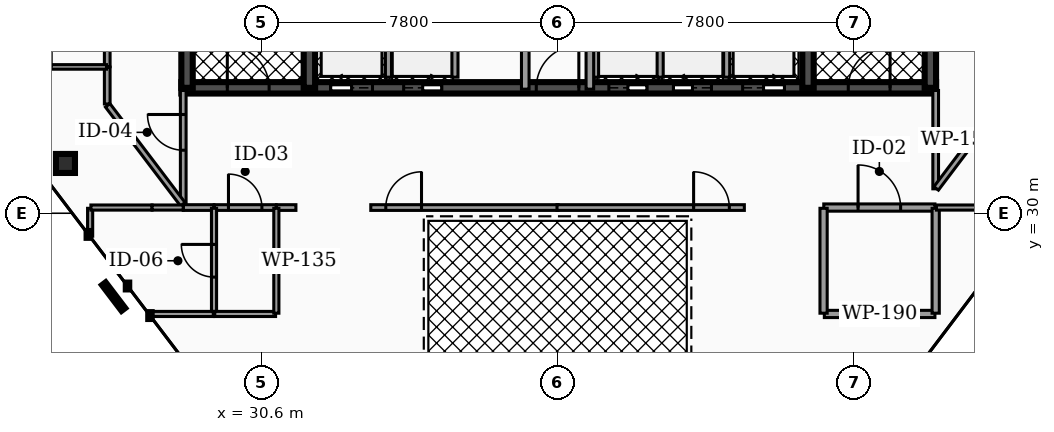
"""IFC4 building model, lengths in metres.
Left out: names, types, materials, properties, quantities, classifications, styles, units other than length and angle.
Written with IfcOpenShell. Run it as: python <this file> out.ifc"""

import sys

from ifc_helpers import new_model, si_unit, direction, frame, frame_2d, origin, origin_2d, place, context, subcontext, project, spatial, rectangle, hollow_rectangle, extrude, element, fill, save


model = new_model("IFC4")
c1 = context("Model", 3, precision=1e-05, world=origin(), true_north=direction((0.0, 1.0)))
c2 = subcontext(c1, "Body", "Model", "MODEL_VIEW")
j1 = project(units=[si_unit("LENGTHUNIT", "METRE"), si_unit("PLANEANGLEUNIT", "RADIAN")], contexts=[c1])
p1 = place(None, origin())
s1 = spatial("IfcSite", under=j1, at=p1, CompositionType="ELEMENT")
p2 = place(p1, origin())
s2 = spatial("IfcBuilding", under=s1, at=p2, CompositionType="ELEMENT")
p3 = place(p2, frame((0.0, 0.0, 275.4)))
s3 = spatial("IfcBuildingStorey", under=s2, at=p3, CompositionType="ELEMENT", Elevation=275.4)
p4 = place(p3, frame((28.5, 33.3, 0.0), z_axis=(0.0, 0.0, 1.0), x_axis=(1.0, 0.0, 0.0)))
e1 = element("IfcWall", 1, at=p4, inside=s3, PredefinedType="SHEAR", context=c2, shape_type="SweptSolid", body=[
    extrude(rectangle(XDim=19.86, YDim=0.3, at=frame_2d((9.93, 0.0))), origin(), (0.0, 0.0, 1.0), 3.18),
])
p5 = place(p4, frame((3.93, 0.0, 0.0)))
e2 = element("IfcOpeningElement", 2, at=p5, cuts=e1, PredefinedType="OPENING", context=c2, shape_type="SweptSolid", body=[
    extrude(rectangle(XDim=1.1, YDim=2.15, at=frame_2d((0.55, 1.075))), frame((0.0, 0.16, 0.0), z_axis=(0.0, -1.0, 0.0), x_axis=(1.0, 0.0, 0.0)), (0.0, 0.0, 1.0), 0.32),
])
p6 = place(p4, frame((14.77, 0.0, 0.0)))
e3 = element("IfcOpeningElement", 3, at=p6, cuts=e1, PredefinedType="OPENING", context=c2, shape_type="SweptSolid", body=[
    extrude(rectangle(XDim=1.1, YDim=2.15, at=frame_2d((0.55, 1.075))), frame((0.0, 0.16, 0.0), z_axis=(0.0, -1.0, 0.0), x_axis=(1.0, 0.0, 0.0)), (0.0, 0.0, 1.0), 0.32),
])
p7 = place(p4, frame((11.25, 0.0, 0.0)))
e4 = element("IfcOpeningElement", 4, at=p7, cuts=e1, PredefinedType="OPENING", context=c2, shape_type="SweptSolid", body=[
    extrude(rectangle(XDim=1.0, YDim=2.1, at=frame_2d((0.5, 1.05))), frame((0.0, 0.16, 0.0), z_axis=(0.0, -1.0, 0.0), x_axis=(1.0, 0.0, 0.0)), (0.0, 0.0, 1.0), 0.32),
])
p8 = place(p4, frame((12.95, 0.0, 0.0)))
e5 = element("IfcOpeningElement", 5, at=p8, cuts=e1, PredefinedType="OPENING", context=c2, shape_type="SweptSolid", body=[
    extrude(rectangle(XDim=1.0, YDim=2.1, at=frame_2d((0.5, 1.05))), frame((0.0, 0.16, 0.0), z_axis=(0.0, -1.0, 0.0), x_axis=(1.0, 0.0, 0.0)), (0.0, 0.0, 1.0), 0.32),
])
p9 = place(p4, frame((5.85, 0.0, 0.0)))
e6 = element("IfcOpeningElement", 6, at=p9, cuts=e1, PredefinedType="OPENING", context=c2, shape_type="SweptSolid", body=[
    extrude(rectangle(XDim=1.0, YDim=2.1, at=frame_2d((0.5, 1.05))), frame((0.0, 0.16, 0.0), z_axis=(0.0, -1.0, 0.0), x_axis=(1.0, 0.0, 0.0)), (0.0, 0.0, 1.0), 0.32),
])
p10 = place(p4, frame((1.21, 0.0, 0.0)))
e7 = element("IfcOpeningElement", 7, at=p10, cuts=e1, PredefinedType="OPENING", context=c2, shape_type="SweptSolid", body=[
    extrude(rectangle(XDim=1.1, YDim=2.2, at=frame_2d((0.55, 1.1))), frame((0.0, 0.16, 0.0), z_axis=(0.0, -1.0, 0.0), x_axis=(1.0, 0.0, 0.0)), (0.0, 0.0, 1.0), 0.32),
])
p11 = place(p4, frame((9.34, 0.0, 0.0)))
e8 = element("IfcOpeningElement", 8, at=p11, cuts=e1, PredefinedType="OPENING", context=c2, shape_type="SweptSolid", body=[
    extrude(rectangle(XDim=1.12, YDim=2.05, at=frame_2d((0.56, 1.025))), frame((0.0, 0.16, 0.0), z_axis=(0.0, -1.0, 0.0), x_axis=(1.0, 0.0, 0.0)), (0.0, 0.0, 1.0), 0.32),
])
p12 = place(p4, frame((17.55, 0.0, 0.0)))
e9 = element("IfcOpeningElement", 9, at=p12, cuts=e1, PredefinedType="OPENING", context=c2, shape_type="SweptSolid", body=[
    extrude(rectangle(XDim=1.1, YDim=2.2, at=frame_2d((0.55, 1.1))), frame((0.0, 0.16, 0.0), z_axis=(0.0, -1.0, 0.0), x_axis=(1.0, 0.0, 0.0)), (0.0, 0.0, 1.0), 0.32),
])
for number, where, z_axis, x_axis in (
    (10, (28.65, 33.3, 0.0), (0.0, 0.0, 1.0), (0.0, 1.0, 0.0)),
    (11, (31.87, 33.3, 0.0), (0.0, 0.0, 1.0), (0.0, 1.0, 0.0)),
    (12, (44.99, 33.3, 0.0), (0.0, 0.0, 1.0), (0.0, 1.0, 0.0)),
    (13, (48.21, 33.3, 0.0), (0.0, 0.0, 1.0), (0.0, 1.0, 0.0)),
):
    element("IfcWall", number, at=place(p3, frame(where, z_axis=z_axis, x_axis=x_axis)), inside=s3, PredefinedType="SHEAR", context=c2, shape_type="SweptSolid", body=[
        extrude(rectangle(XDim=10.1, YDim=0.3, at=frame_2d((5.05, 0.0))), origin(), (0.0, 0.0, 1.0), 3.18),
    ])
p13 = place(p3, frame((25.451, 31.31, 0.0), z_axis=(0.06991126496, 0.123712542777, 0.989852323224), x_axis=(-0.870602675334, 0.491986769845, 0.0)))
e14 = element("IfcColumn", 14, at=p13, inside=s3, PredefinedType="COLUMN", context=c2, shape_type="SweptSolid", body=[
    extrude(hollow_rectangle(XDim=0.5, YDim=0.5, WallThickness=0.025, at=origin_2d()), origin(), (0.0, 0.0, 1.0), 3.213),
])
p14 = place(p3, frame((29.731, 25.674, 0.0), z_axis=(0.069335984522, 0.128875318438, 0.989233882127), x_axis=(-0.880637676987, 0.47379033535, 0.0)))
e15 = element("IfcColumn", 15, at=p14, inside=s3, PredefinedType="COLUMN", context=c2, shape_type="SweptSolid", body=[
    extrude(hollow_rectangle(XDim=0.5, YDim=0.5, WallThickness=0.025, at=origin_2d()), origin(), (0.0, 0.0, 1.0), 3.215),
])
p15 = place(p3, frame((46.938, 25.77, 0.0), z_axis=(-0.133126474894, 0.126032433715, 0.983052982974), x_axis=(-0.687493396244, -0.726190629326, 0.0)))
e16 = element("IfcColumn", 16, at=p15, inside=s3, PredefinedType="COLUMN", context=c2, shape_type="SweptSolid", body=[
    extrude(hollow_rectangle(XDim=0.5, YDim=0.5, WallThickness=0.025, at=origin_2d()), origin(), (0.0, 0.0, 1.0), 3.235),
])
for number, where, z_axis, x_axis in (
    (17, (33.95, 33.58, 0.0), (0.0, 0.0, 1.0), (0.0, 1.0, 0.0)),
    (18, (42.85, 33.58, 0.0), (0.0, 0.0, 1.0), (0.0, 1.0, 0.0)),
):
    element("IfcWall", number, at=place(p3, frame(where, z_axis=z_axis, x_axis=x_axis)), inside=s3, PredefinedType="SOLIDWALL", context=c2, shape_type="SweptSolid", body=[
        extrude(rectangle(XDim=2.45, YDim=0.16, at=frame_2d((1.225, 0.0))), origin(), (0.0, 0.0, 1.0), 3.18),
    ])
for number, where, z_axis, x_axis in (
    (19, (39.4, 33.58, 0.0), (0.0, 0.0, 1.0), (0.0, 1.0, 0.0)),
    (20, (41.1, 33.58, 0.0), (0.0, 0.0, 1.0), (0.0, 1.0, 0.0)),
    (21, (35.7, 33.58, 0.0), (0.0, 0.0, 1.0), (0.0, 1.0, 0.0)),
):
    element("IfcWall", number, at=place(p3, frame(where, z_axis=z_axis, x_axis=x_axis)), inside=s3, PredefinedType="SOLIDWALL", context=c2, shape_type="SweptSolid", body=[
        extrude(rectangle(XDim=2.25, YDim=0.16, at=frame_2d((1.125, 0.0))), origin(), (0.0, 0.0, 1.0), 3.18),
    ])
p16 = place(p3, frame((37.55, 33.265, 0.0), z_axis=(0.0, 0.0, 1.0), x_axis=(0.0, 1.0, 0.0)))
e22 = element("IfcWall", 22, at=p16, inside=s3, PredefinedType="PARTITIONING", context=c2, shape_type="SweptSolid", body=[
    extrude(rectangle(XDim=3.615, YDim=0.2, at=frame_2d((1.808, 0.0))), origin(), (0.0, 0.0, 1.0), 2.235),
])
p17 = place(p16, frame((1.367, 0.0, 0.0)))
e23 = element("IfcOpeningElement", 23, at=p17, cuts=e22, PredefinedType="OPENING", context=c2, shape_type="SweptSolid", body=[
    extrude(rectangle(XDim=0.88, YDim=2.05, at=frame_2d((0.44, 1.025))), frame((0.0, 0.11, 0.0), z_axis=(0.0, -1.0, 0.0), x_axis=(1.0, 0.0, 0.0)), (0.0, 0.0, 1.0), 0.22),
])
p18 = place(p3, frame((39.25, 33.265, 0.0), z_axis=(0.0, 0.0, 1.0), x_axis=(0.0, 1.0, 0.0)))
e24 = element("IfcWall", 24, at=p18, inside=s3, PredefinedType="PARTITIONING", context=c2, shape_type="SweptSolid", body=[
    extrude(rectangle(XDim=3.615, YDim=0.2, at=frame_2d((1.808, 0.0))), origin(), (0.0, 0.0, 1.0), 2.235),
])
p19 = place(p3, frame((45.405, 30.15, 0.0), z_axis=(0.0, 0.0, 1.0), x_axis=(1.0, 0.0, 0.0)))
e25 = element("IfcWall", 25, at=p19, inside=s3, PredefinedType="PARTITIONING", context=c2, shape_type="SweptSolid", body=[
    extrude(rectangle(XDim=2.925, YDim=0.19, at=frame_2d((1.462, 0.0))), origin(), (0.0, 0.0, 1.0), 2.235),
])
p20 = place(p19, frame((0.903, 0.0, 0.0)))
e26 = element("IfcOpeningElement", 26, at=p20, cuts=e25, PredefinedType="OPENING", context=c2, shape_type="SweptSolid", body=[
    extrude(rectangle(XDim=1.12, YDim=2.05, at=frame_2d((0.56, 1.025))), frame((0.0, 0.105, 0.0), z_axis=(0.0, -1.0, 0.0), x_axis=(1.0, 0.0, 0.0)), (0.0, 0.0, 1.0), 0.21),
])
p21 = place(p3, frame((28.55, 30.227, 0.0), z_axis=(0.0, 0.0, 1.0), x_axis=(0.0, 1.0, 0.0)))
e27 = element("IfcWall", 27, at=p21, inside=s3, PredefinedType="PARTITIONING", context=c2, shape_type="SweptSolid", body=[
    extrude(rectangle(XDim=3.003, YDim=0.15, at=frame_2d((1.501, 0.0))), origin(), (0.0, 0.0, 1.0), 2.235),
])
p22 = place(p21, frame((1.431, 0.0, 0.0)))
e28 = element("IfcOpeningElement", 28, at=p22, cuts=e27, PredefinedType="OPENING", context=c2, shape_type="SweptSolid", body=[
    extrude(rectangle(XDim=0.94, YDim=2.05, at=frame_2d((0.47, 1.025))), frame((0.0, 0.085, 0.0), z_axis=(0.0, -1.0, 0.0), x_axis=(1.0, 0.0, 0.0)), (0.0, 0.0, 1.0), 0.17),
])
p23 = place(p3, frame((48.35, 30.643, 0.0), z_axis=(0.0, 0.0, 1.0), x_axis=(0.0, 1.0, 0.0)))
e29 = element("IfcWall", 29, at=p23, inside=s3, PredefinedType="PARTITIONING", context=c2, shape_type="SweptSolid", body=[
    extrude(rectangle(XDim=2.587, YDim=0.15, at=frame_2d((1.294, 0.0))), origin(), (0.0, 0.0, 1.0), 2.235),
])
p24 = place(p3, frame((29.365, 30.15, 0.0), z_axis=(0.0, 0.0, 1.0), x_axis=(1.0, 0.0, 0.0)))
e30 = element("IfcWall", 30, at=p24, inside=s3, PredefinedType="PARTITIONING", context=c2, shape_type="SweptSolid", body=[
    extrude(rectangle(XDim=1.63, YDim=0.15, at=frame_2d((0.815, 0.0))), origin(), (0.0, 0.0, 1.0), 2.235),
])
p25 = place(p24, frame((0.375, 0.0, 0.0)))
e31 = element("IfcOpeningElement", 31, at=p25, cuts=e30, PredefinedType="OPENING", context=c2, shape_type="SweptSolid", body=[
    extrude(rectangle(XDim=0.88, YDim=2.05, at=frame_2d((0.44, 1.025))), frame((0.0, 0.085, 0.0), z_axis=(0.0, -1.0, 0.0), x_axis=(1.0, 0.0, 0.0)), (0.0, 0.0, 1.0), 0.17),
])
p26 = place(p3, frame((28.55, 30.15, 0.0), z_axis=(0.0, 0.0, 1.0), x_axis=(1.0, 0.0, 0.0)))
e32 = element("IfcWall", 32, at=p26, inside=s3, PredefinedType="PARTITIONING", context=c2, shape_type="SweptSolid", body=[
    extrude(rectangle(XDim=0.805, YDim=0.15, at=frame_2d((0.402, 0.0))), origin(), (0.0, 0.0, 1.0), 2.235),
])
p27 = place(p3, frame((33.485, 30.15, 0.0), z_axis=(0.0, 0.0, 1.0), x_axis=(1.0, 0.0, 0.0)))
e33 = element("IfcWall", 33, at=p27, inside=s3, PredefinedType="PARTITIONING", context=c2, shape_type="SweptSolid", body=[
    extrude(rectangle(XDim=4.93, YDim=0.15, at=frame_2d((2.465, 0.0))), origin(), (0.0, 0.0, 1.0), 2.235),
])
p28 = place(p27, frame((0.395, 0.0, 0.0)))
e34 = element("IfcOpeningElement", 34, at=p28, cuts=e33, PredefinedType="OPENING", context=c2, shape_type="SweptSolid", body=[
    extrude(rectangle(XDim=0.94, YDim=2.05, at=frame_2d((0.47, 1.025))), frame((0.0, 0.085, 0.0), z_axis=(0.0, -1.0, 0.0), x_axis=(1.0, 0.0, 0.0)), (0.0, 0.0, 1.0), 0.17),
])
p29 = place(p3, frame((31.005, 30.15, 0.0), z_axis=(0.0, 0.0, 1.0), x_axis=(1.0, 0.0, 0.0)))
e35 = element("IfcWall", 35, at=p29, inside=s3, PredefinedType="PARTITIONING", context=c2, shape_type="SweptSolid", body=[
    extrude(rectangle(XDim=0.51, YDim=0.15, at=frame_2d((0.255, 0.0))), origin(), (0.0, 0.0, 1.0), 2.235),
])
p30 = place(p3, frame((38.385, 30.15, 0.0), z_axis=(0.0, 0.0, 1.0), x_axis=(1.0, 0.0, 0.0)))
e36 = element("IfcWall", 36, at=p30, inside=s3, PredefinedType="PARTITIONING", context=c2, shape_type="SweptSolid", body=[
    extrude(rectangle(XDim=4.93, YDim=0.15, at=frame_2d((2.465, 0.0))), origin(), (0.0, 0.0, 1.0), 2.235),
])
p31 = place(p30, frame((3.595, 0.0, 0.0)))
e37 = element("IfcOpeningElement", 37, at=p31, cuts=e36, PredefinedType="OPENING", context=c2, shape_type="SweptSolid", body=[
    extrude(rectangle(XDim=0.94, YDim=2.05, at=frame_2d((0.47, 1.025))), frame((0.0, 0.085, 0.0), z_axis=(0.0, -1.0, 0.0), x_axis=(1.0, 0.0, 0.0)), (0.0, 0.0, 1.0), 0.17),
])
p32 = place(p3, frame((45.42, 27.35, 0.0), z_axis=(0.0, 0.0, 1.0), x_axis=(1.0, 0.0, 0.0)))
e38 = element("IfcWall", 38, at=p32, inside=s3, PredefinedType="PARTITIONING", context=c2, shape_type="SweptSolid", body=[
    extrude(rectangle(XDim=2.91, YDim=0.19, at=frame_2d((1.455, 0.0))), origin(), (0.0, 0.0, 1.0), 2.235),
])
for number, where, z_axis, x_axis in (
    (39, (45.4, 27.37, 0.0), (0.0, 0.0, 1.0), (0.0, 1.0, 0.0)),
    (40, (48.35, 27.37, 0.0), (0.0, 0.0, 1.0), (0.0, 1.0, 0.0)),
):
    element("IfcWall", number, at=place(p3, frame(where, z_axis=z_axis, x_axis=x_axis)), inside=s3, PredefinedType="PARTITIONING", context=c2, shape_type="SweptSolid", body=[
        extrude(rectangle(XDim=2.76, YDim=0.19, at=frame_2d((1.38, 0.0))), origin(), (0.0, 0.0, 1.0), 2.235),
    ])
p33 = place(p3, frame((26.55, 33.855, 0.0), z_axis=(0.0, 0.0, 1.0), x_axis=(0.0, 1.0, 0.0)))
e41 = element("IfcWall", 41, at=p33, inside=s3, PredefinedType="PARTITIONING", context=c2, shape_type="SweptSolid", body=[
    extrude(rectangle(XDim=9.695, YDim=0.15, at=frame_2d((4.847, 0.0))), origin(), (0.0, 0.0, 1.0), 2.235),
])
p34 = place(p33, frame((4.377, 0.0, 0.0)))
e42 = element("IfcOpeningElement", 42, at=p34, cuts=e41, PredefinedType="OPENING", context=c2, shape_type="SweptSolid", body=[
    extrude(rectangle(XDim=0.94, YDim=2.05, at=frame_2d((0.47, 1.025))), frame((0.0, 0.085, 0.0), z_axis=(0.0, -1.0, 0.0), x_axis=(1.0, 0.0, 0.0)), (0.0, 0.0, 1.0), 0.17),
])
p35 = place(p3, frame((26.562, 32.84, 0.0), z_axis=(0.0, 0.0, 1.0), x_axis=(0.604783852999, -0.796389660375, 0.0)))
e43 = element("IfcWall", 43, at=p35, inside=s3, PredefinedType="PARTITIONING", context=c2, shape_type="SweptSolid", body=[
    extrude(rectangle(XDim=3.267, YDim=0.15, at=frame_2d((1.634, 0.0))), origin(), (0.0, 0.0, 1.0), 2.235),
])
p36 = place(p3, frame((26.55, 32.875, 0.0), z_axis=(0.0, 0.0, 1.0), x_axis=(0.0, 1.0, 0.0)))
e44 = element("IfcWall", 44, at=p36, inside=s3, PredefinedType="PARTITIONING", context=c2, shape_type="SweptSolid", body=[
    extrude(rectangle(XDim=0.97, YDim=0.15, at=frame_2d((0.485, 0.0))), origin(), (0.0, 0.0, 1.0), 2.235),
])
p37 = place(p3, frame((48.362, 30.654, 0.0), z_axis=(0.0, 0.0, 1.0), x_axis=(0.603189668488, 0.79759778324, 0.0)))
e45 = element("IfcWall", 45, at=p37, inside=s3, PredefinedType="PARTITIONING", context=c2, shape_type="SweptSolid", body=[
    extrude(rectangle(XDim=2.886, YDim=0.15, at=frame_2d((1.443, 0.0))), origin(), (0.0, 0.0, 1.0), 2.235),
])
p38 = place(p3, frame((29.36, 27.37, 0.0), z_axis=(0.0, 0.0, 1.0), x_axis=(0.0, 1.0, 0.0)))
e46 = element("IfcWall", 46, at=p38, inside=s3, PredefinedType="PARTITIONING", context=c2, shape_type="SweptSolid", body=[
    extrude(rectangle(XDim=2.76, YDim=0.135, at=frame_2d((1.38, 0.0))), origin(), (0.0, 0.0, 1.0), 2.235),
])
p39 = place(p38, frame((0.95, 0.0, 0.0)))
e47 = element("IfcOpeningElement", 47, at=p39, cuts=e46, PredefinedType="OPENING", context=c2, shape_type="SweptSolid", body=[
    extrude(rectangle(XDim=0.86, YDim=2.05, at=frame_2d((0.43, 1.025))), frame((0.0, 0.077, 0.0), z_axis=(0.0, -1.0, 0.0), x_axis=(1.0, 0.0, 0.0)), (0.0, 0.0, 1.0), 0.155),
])
p40 = place(p3, frame((29.38, 27.35, 0.0), z_axis=(0.0, 0.0, 1.0), x_axis=(1.0, 0.0, 0.0)))
e48 = element("IfcWall", 48, at=p40, inside=s3, PredefinedType="PARTITIONING", context=c2, shape_type="SweptSolid", body=[
    extrude(rectangle(XDim=1.6, YDim=0.135, at=frame_2d((0.8, 0.0))), origin(), (0.0, 0.0, 1.0), 2.235),
])
p41 = place(p3, frame((31.0, 27.37, 0.0), z_axis=(0.0, 0.0, 1.0), x_axis=(0.0, 1.0, 0.0)))
e49 = element("IfcWall", 49, at=p41, inside=s3, PredefinedType="PARTITIONING", context=c2, shape_type="SweptSolid", body=[
    extrude(rectangle(XDim=2.76, YDim=0.135, at=frame_2d((1.38, 0.0))), origin(), (0.0, 0.0, 1.0), 2.235),
])
p42 = place(p3, frame((27.657, 27.35, 0.0), z_axis=(0.0, 0.0, 1.0), x_axis=(1.0, 0.0, 0.0)))
e50 = element("IfcWall", 50, at=p42, inside=s3, PredefinedType="PARTITIONING", context=c2, shape_type="SweptSolid", body=[
    extrude(rectangle(XDim=1.683, YDim=0.135, at=frame_2d((0.842, 0.0))), origin(), (0.0, 0.0, 1.0), 2.235),
])
p43 = place(p3, frame((26.1, 29.396, 0.0), z_axis=(0.0, 0.0, 1.0), x_axis=(0.0, 1.0, 0.0)))
e51 = element("IfcWall", 51, at=p43, inside=s3, PredefinedType="PARTITIONING", context=c2, shape_type="SweptSolid", body=[
    extrude(rectangle(XDim=0.734, YDim=0.135, at=frame_2d((0.367, 0.0))), origin(), (0.0, 0.0, 1.0), 2.235),
])
p44 = place(p3, frame((26.12, 30.15, 0.0), z_axis=(0.0, 0.0, 1.0), x_axis=(1.0, 0.0, 0.0)))
e52 = element("IfcWall", 52, at=p44, inside=s3, PredefinedType="PARTITIONING", context=c2, shape_type="SweptSolid", body=[
    extrude(rectangle(XDim=1.61, YDim=0.135, at=frame_2d((0.805, 0.0))), origin(), (0.0, 0.0, 1.0), 2.235),
])
p45 = place(p3, frame((27.73, 30.15, 0.0), z_axis=(0.0, 0.0, 1.0), x_axis=(1.0, 0.0, 0.0)))
e53 = element("IfcWall", 53, at=p45, inside=s3, PredefinedType="PARTITIONING", context=c2, shape_type="SweptSolid", body=[
    extrude(rectangle(XDim=0.82, YDim=0.135, at=frame_2d((0.41, 0.0))), origin(), (0.0, 0.0, 1.0), 2.235),
])
p46 = place(p3, frame((48.37, 30.15, 0.0), z_axis=(0.0, 0.0, 1.0), x_axis=(1.0, 0.0, 0.0)))
e54 = element("IfcWall", 54, at=p46, inside=s3, PredefinedType="PARTITIONING", context=c2, shape_type="SweptSolid", body=[
    extrude(rectangle(XDim=2.68, YDim=0.135, at=frame_2d((1.34, 0.0))), origin(), (0.0, 0.0, 1.0), 2.235),
])
p47 = place(p3, frame((22.721, 33.85, 0.0), z_axis=(0.0, 0.0, 1.0), x_axis=(1.0, 0.0, 0.0)))
e55 = element("IfcWall", 55, at=p47, inside=s3, PredefinedType="PARTITIONING", context=c2, shape_type="SweptSolid", body=[
    extrude(rectangle(XDim=3.809, YDim=0.12, at=frame_2d((1.905, 0.0))), origin(), (0.0, 0.0, 1.0), 2.235),
])
p48 = place(p47, frame((1.455, 0.0, 0.0)))
e56 = element("IfcOpeningElement", 56, at=p48, cuts=e55, PredefinedType="OPENING", context=c2, shape_type="SweptSolid", body=[
    extrude(rectangle(XDim=0.9, YDim=2.05, at=frame_2d((0.45, 1.025))), frame((0.0, 0.07, 0.0), z_axis=(0.0, -1.0, 0.0), x_axis=(1.0, 0.0, 0.0)), (0.0, 0.0, 1.0), 0.14),
])
p49 = place(p5, origin())
e57 = element("IfcDoor", 57, at=p49, inside=s3, OperationType="SLIDING_TO_LEFT", PredefinedType="DOOR", context=c2, shape_type="SweptSolid", body=[
    extrude(rectangle(XDim=1.1, YDim=2.15, at=frame_2d((0.55, 1.075))), frame((0.0, 0.025, 0.0), z_axis=(0.0, -1.0, 0.0), x_axis=(1.0, 0.0, 0.0)), (0.0, 0.0, 1.0), 0.05),
])
fill(e2, e57)
p50 = place(p6, origin())
e58 = element("IfcDoor", 58, at=p50, inside=s3, OperationType="SLIDING_TO_RIGHT", PredefinedType="DOOR", context=c2, shape_type="SweptSolid", body=[
    extrude(rectangle(XDim=1.1, YDim=2.15, at=frame_2d((0.55, 1.075))), frame((0.0, 0.025, 0.0), z_axis=(0.0, -1.0, 0.0), x_axis=(1.0, 0.0, 0.0)), (0.0, 0.0, 1.0), 0.05),
])
fill(e3, e58)
p51 = place(p7, origin())
e59 = element("IfcDoor", 59, at=p51, inside=s3, OperationType="SLIDING_TO_RIGHT", PredefinedType="DOOR", context=c2, shape_type="SweptSolid", body=[
    extrude(rectangle(XDim=1.0, YDim=2.1, at=frame_2d((0.5, 1.05))), frame((0.0, 0.025, 0.0), z_axis=(0.0, -1.0, 0.0), x_axis=(1.0, 0.0, 0.0)), (0.0, 0.0, 1.0), 0.05),
])
fill(e4, e59)
p52 = place(p8, origin())
e60 = element("IfcDoor", 60, at=p52, inside=s3, OperationType="SLIDING_TO_LEFT", PredefinedType="DOOR", context=c2, shape_type="SweptSolid", body=[
    extrude(rectangle(XDim=1.0, YDim=2.1, at=frame_2d((0.5, 1.05))), frame((0.0, 0.025, 0.0), z_axis=(0.0, -1.0, 0.0), x_axis=(1.0, 0.0, 0.0)), (0.0, 0.0, 1.0), 0.05),
])
fill(e5, e60)
p53 = place(p9, origin())
e61 = element("IfcDoor", 61, at=p53, inside=s3, OperationType="SLIDING_TO_RIGHT", PredefinedType="DOOR", context=c2, shape_type="SweptSolid", body=[
    extrude(rectangle(XDim=1.0, YDim=2.1, at=frame_2d((0.5, 1.05))), frame((0.0, 0.025, 0.0), z_axis=(0.0, -1.0, 0.0), x_axis=(1.0, 0.0, 0.0)), (0.0, 0.0, 1.0), 0.05),
])
fill(e6, e61)
p54 = place(p10, origin())
e62 = element("IfcDoor", 62, at=p54, inside=s3, OperationType="SINGLE_SWING_LEFT", PredefinedType="DOOR", context=c2, shape_type="SweptSolid", body=[
    extrude(rectangle(XDim=1.1, YDim=2.2, at=frame_2d((0.55, 1.1))), frame((0.0, 0.025, 0.0), z_axis=(0.0, -1.0, 0.0), x_axis=(1.0, 0.0, 0.0)), (0.0, 0.0, 1.0), 0.05),
])
fill(e7, e62)
p55 = place(p11, origin())
e63 = element("IfcDoor", 63, at=p55, inside=s3, OperationType="SINGLE_SWING_RIGHT", PredefinedType="DOOR", context=c2, shape_type="SweptSolid", body=[
    extrude(rectangle(XDim=1.12, YDim=2.05, at=frame_2d((0.56, 1.025))), frame((0.0, 0.025, 0.0), z_axis=(0.0, -1.0, 0.0), x_axis=(1.0, 0.0, 0.0)), (0.0, 0.0, 1.0), 0.05),
])
fill(e8, e63)
p56 = place(p12, origin())
e64 = element("IfcDoor", 64, at=p56, inside=s3, OperationType="SINGLE_SWING_RIGHT", PredefinedType="DOOR", context=c2, shape_type="SweptSolid", body=[
    extrude(rectangle(XDim=1.1, YDim=2.2, at=frame_2d((0.55, 1.1))), frame((0.0, 0.025, 0.0), z_axis=(0.0, -1.0, 0.0), x_axis=(1.0, 0.0, 0.0)), (0.0, 0.0, 1.0), 0.05),
])
fill(e9, e64)
p57 = place(p20, origin())
e65 = element("IfcDoor", 65, at=p57, inside=s3, OperationType="SINGLE_SWING_LEFT", PredefinedType="DOOR", context=c2, shape_type="SweptSolid", body=[
    extrude(rectangle(XDim=1.12, YDim=2.05, at=frame_2d((0.56, 1.025))), frame((0.0, 0.025, 0.0), z_axis=(0.0, -1.0, 0.0), x_axis=(1.0, 0.0, 0.0)), (0.0, 0.0, 1.0), 0.05),
])
fill(e26, e65)
p58 = place(p22, origin())
e66 = element("IfcDoor", 66, at=p58, inside=s3, OperationType="SINGLE_SWING_RIGHT", PredefinedType="DOOR", context=c2, shape_type="SweptSolid", body=[
    extrude(rectangle(XDim=0.94, YDim=2.05, at=frame_2d((0.47, 1.025))), frame((0.0, 0.025, 0.0), z_axis=(0.0, -1.0, 0.0), x_axis=(1.0, 0.0, 0.0)), (0.0, 0.0, 1.0), 0.05),
])
fill(e28, e66)
p59 = place(p25, origin())
e67 = element("IfcDoor", 67, at=p59, inside=s3, OperationType="SINGLE_SWING_LEFT", PredefinedType="DOOR", context=c2, shape_type="SweptSolid", body=[
    extrude(rectangle(XDim=0.88, YDim=2.05, at=frame_2d((0.44, 1.025))), frame((0.0, 0.025, 0.0), z_axis=(0.0, -1.0, 0.0), x_axis=(1.0, 0.0, 0.0)), (0.0, 0.0, 1.0), 0.05),
])
fill(e31, e67)
p60 = place(p28, origin())
e68 = element("IfcDoor", 68, at=p60, inside=s3, OperationType="SINGLE_SWING_RIGHT", PredefinedType="DOOR", context=c2, shape_type="SweptSolid", body=[
    extrude(rectangle(XDim=0.94, YDim=2.05, at=frame_2d((0.47, 1.025))), frame((0.0, 0.025, 0.0), z_axis=(0.0, -1.0, 0.0), x_axis=(1.0, 0.0, 0.0)), (0.0, 0.0, 1.0), 0.05),
])
fill(e34, e68)
p61 = place(p31, origin())
e69 = element("IfcDoor", 69, at=p61, inside=s3, OperationType="SINGLE_SWING_LEFT", PredefinedType="DOOR", context=c2, shape_type="SweptSolid", body=[
    extrude(rectangle(XDim=0.94, YDim=2.05, at=frame_2d((0.47, 1.025))), frame((0.0, 0.025, 0.0), z_axis=(0.0, -1.0, 0.0), x_axis=(1.0, 0.0, 0.0)), (0.0, 0.0, 1.0), 0.05),
])
fill(e37, e69)
p62 = place(p39, origin())
e70 = element("IfcDoor", 70, at=p62, inside=s3, OperationType="SINGLE_SWING_RIGHT", PredefinedType="DOOR", context=c2, shape_type="SweptSolid", body=[
    extrude(rectangle(XDim=0.86, YDim=2.05, at=frame_2d((0.43, 1.025))), frame((0.0, 0.025, 0.0), z_axis=(0.0, -1.0, 0.0), x_axis=(1.0, 0.0, 0.0)), (0.0, 0.0, 1.0), 0.05),
])
fill(e47, e70)
save(model, sys.argv[1])
